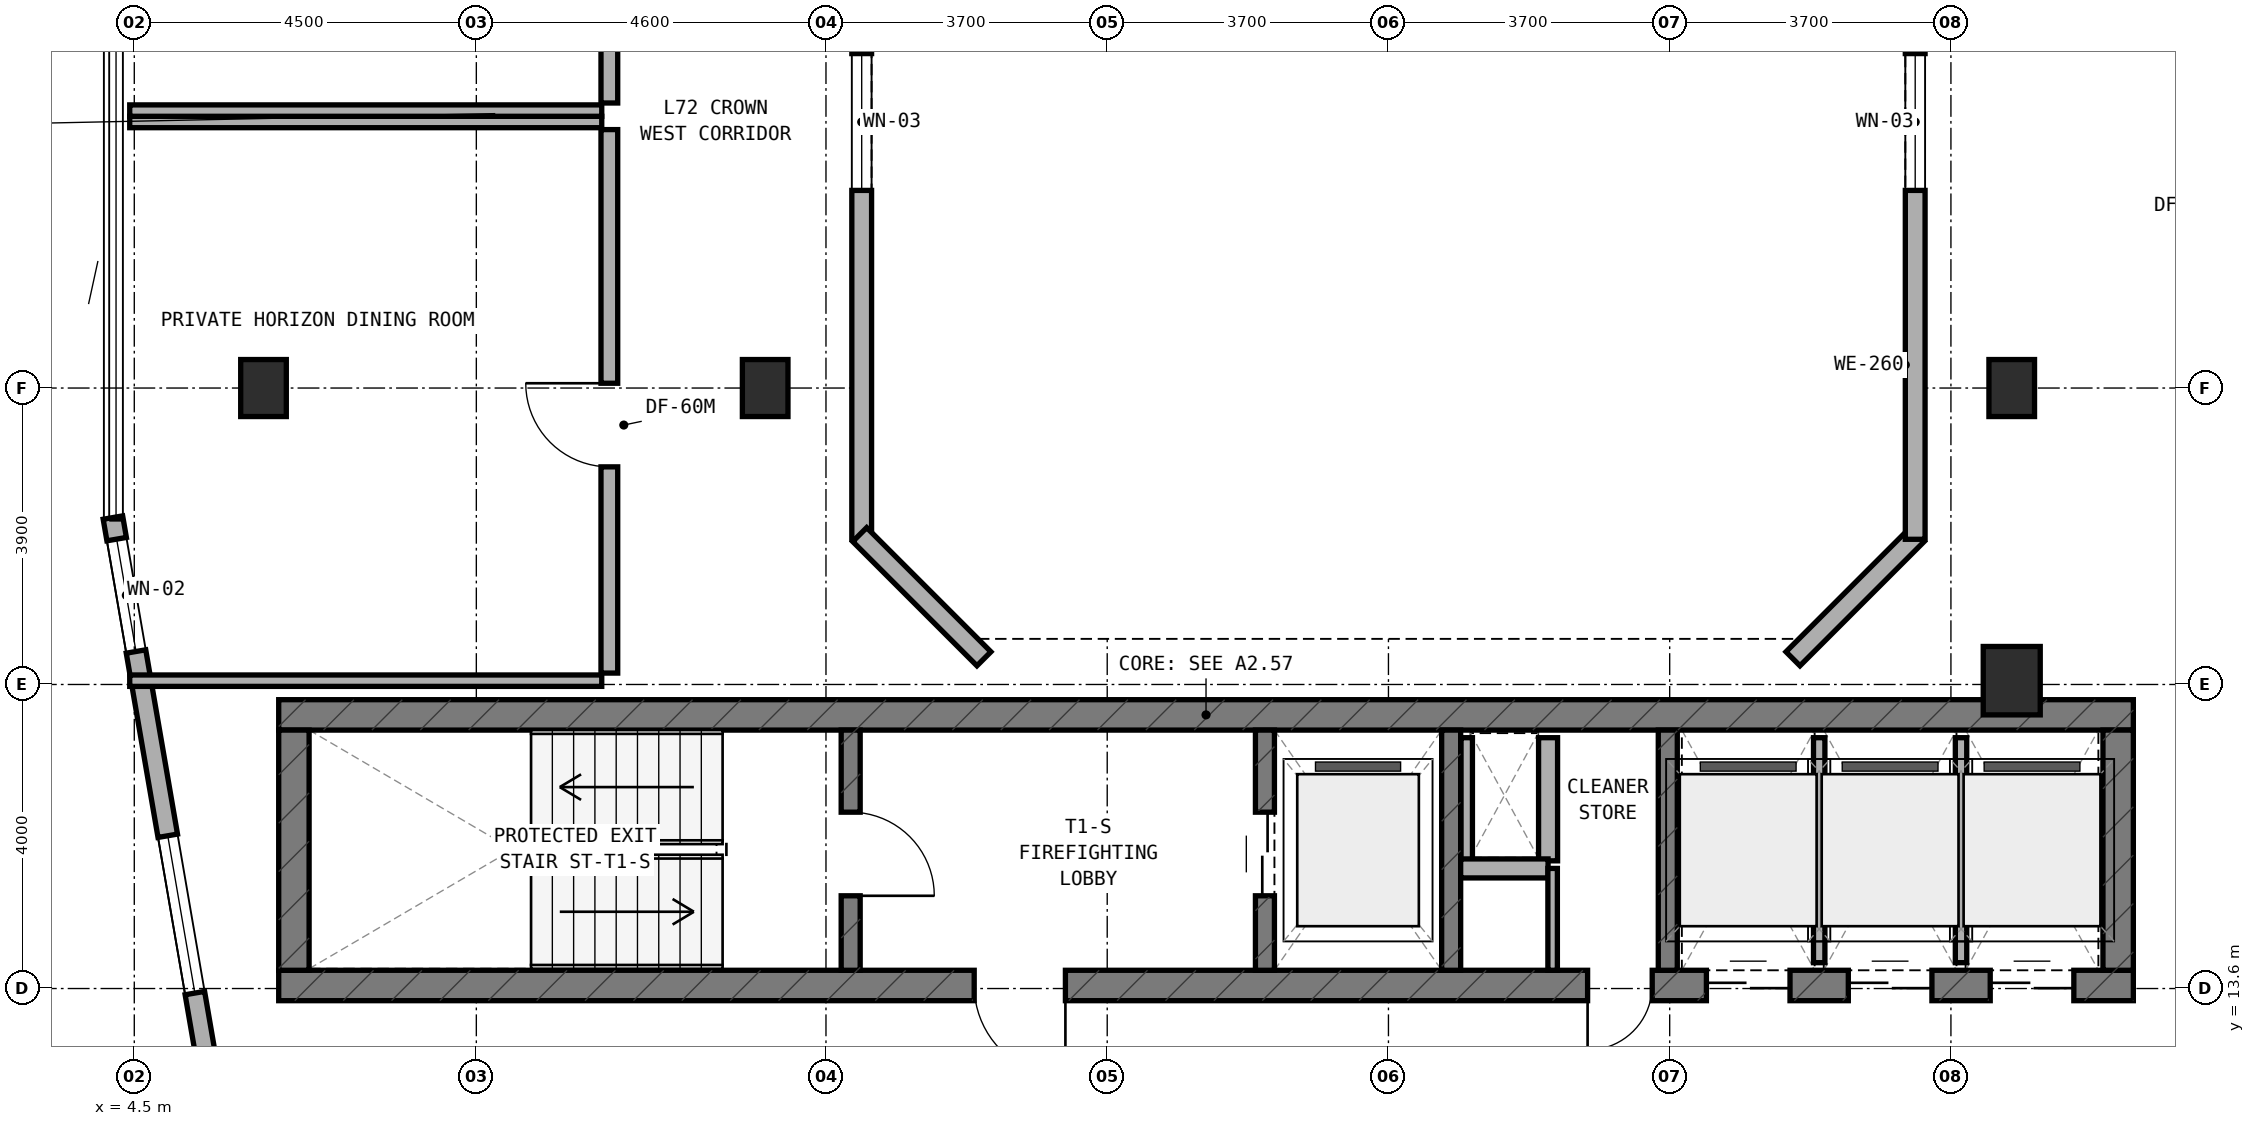
"""IFC4 building model, lengths in metres.
Left out: names, types, materials, properties, quantities, classifications, styles, units other than length and angle.
Written with IfcOpenShell. Run it as: python <this file> out.ifc"""

import sys

from ifc_helpers import new_model, si_unit, direction, frame, frame_2d, origin, origin_2d, place, context, subcontext, project, spatial, rectangle, extrude, element, fill, save


model = new_model("IFC4")
c1 = context("Model", 3, precision=1e-05, world=origin(), true_north=direction((0.0, 1.0)))
c2 = subcontext(c1, "Body", "Model", "MODEL_VIEW")
j1 = project(units=[si_unit("LENGTHUNIT", "METRE"), si_unit("PLANEANGLEUNIT", "RADIAN")], contexts=[c1])
p1 = place(None, origin())
s1 = spatial("IfcSite", under=j1, at=p1, CompositionType="ELEMENT")
p2 = place(p1, origin())
s2 = spatial("IfcBuilding", under=s1, at=p2, CompositionType="ELEMENT")
p3 = place(p2, frame((0.0, 0.0, 264.8)))
s3 = spatial("IfcBuildingStorey", under=s2, at=p3, CompositionType="ELEMENT", Elevation=264.8)
p4 = place(p3, frame((6.4, 13.64, 0.0), z_axis=(0.0, 0.0, 1.0), x_axis=(1.0, 0.0, 0.0)))
e1 = element("IfcWall", 1, at=p4, inside=s3, PredefinedType="SHEAR", context=c2, shape_type="SweptSolid", body=[
    extrude(rectangle(XDim=24.4, YDim=0.4, at=frame_2d((12.2, 0.0))), origin(), (0.0, 0.0, 1.0), 3.6),
])
p5 = place(p4, frame((9.15, 0.0, 0.0)))
e2 = element("IfcOpeningElement", 2, at=p5, cuts=e1, PredefinedType="OPENING", context=c2, shape_type="SweptSolid", body=[
    extrude(rectangle(XDim=1.2, YDim=2.15, at=frame_2d((0.6, 1.075))), frame((0.0, 0.21, 0.0), z_axis=(0.0, -1.0, 0.0), x_axis=(1.0, 0.0, 0.0)), (0.0, 0.0, 1.0), 0.42),
])
p6 = place(p4, frame((17.22, 0.0, 0.0)))
e3 = element("IfcOpeningElement", 3, at=p6, cuts=e1, PredefinedType="OPENING", context=c2, shape_type="SweptSolid", body=[
    extrude(rectangle(XDim=0.85, YDim=2.1, at=frame_2d((0.425, 1.05))), frame((0.0, 0.21, 0.0), z_axis=(0.0, -1.0, 0.0), x_axis=(1.0, 0.0, 0.0)), (0.0, 0.0, 1.0), 0.42),
])
p7 = place(p4, frame((18.783, 0.0, 0.0)))
e4 = element("IfcOpeningElement", 4, at=p7, cuts=e1, PredefinedType="OPENING", context=c2, shape_type="SweptSolid", body=[
    extrude(rectangle(XDim=1.1, YDim=2.15, at=frame_2d((0.55, 1.075))), frame((0.0, 0.21, 0.0), z_axis=(0.0, -1.0, 0.0), x_axis=(1.0, 0.0, 0.0)), (0.0, 0.0, 1.0), 0.42),
])
p8 = place(p4, frame((20.65, 0.0, 0.0)))
e5 = element("IfcOpeningElement", 5, at=p8, cuts=e1, PredefinedType="OPENING", context=c2, shape_type="SweptSolid", body=[
    extrude(rectangle(XDim=1.1, YDim=2.15, at=frame_2d((0.55, 1.075))), frame((0.0, 0.21, 0.0), z_axis=(0.0, -1.0, 0.0), x_axis=(1.0, 0.0, 0.0)), (0.0, 0.0, 1.0), 0.42),
])
p9 = place(p4, frame((22.517, 0.0, 0.0)))
e6 = element("IfcOpeningElement", 6, at=p9, cuts=e1, PredefinedType="OPENING", context=c2, shape_type="SweptSolid", body=[
    extrude(rectangle(XDim=1.1, YDim=2.15, at=frame_2d((0.55, 1.075))), frame((0.0, 0.21, 0.0), z_axis=(0.0, -1.0, 0.0), x_axis=(1.0, 0.0, 0.0)), (0.0, 0.0, 1.0), 0.42),
])
p10 = place(p3, frame((6.4, 17.2, 0.0), z_axis=(0.0, 0.0, 1.0), x_axis=(1.0, 0.0, 0.0)))
e7 = element("IfcWall", 7, at=p10, inside=s3, PredefinedType="SHEAR", context=c2, shape_type="SweptSolid", body=[
    extrude(rectangle(XDim=24.4, YDim=0.4, at=frame_2d((12.2, 0.0))), origin(), (0.0, 0.0, 1.0), 3.6),
])
for number, where, z_axis, x_axis in (
    (8, (6.6, 13.84, 0.0), (0.0, 0.0, 1.0), (0.0, 1.0, 0.0)),
    (9, (30.6, 13.84, 0.0), (0.0, 0.0, 1.0), (0.0, 1.0, 0.0)),
):
    element("IfcWall", number, at=place(p3, frame(where, z_axis=z_axis, x_axis=x_axis)), inside=s3, PredefinedType="SHEAR", context=c2, shape_type="SweptSolid", body=[
        extrude(rectangle(XDim=3.16, YDim=0.4, at=frame_2d((1.58, 0.0))), origin(), (0.0, 0.0, 1.0), 3.6),
    ])
p11 = place(p3, frame((13.925, 13.84, 0.0), z_axis=(0.0, 0.0, 1.0), x_axis=(0.0, 1.0, 0.0)))
e10 = element("IfcWall", 10, at=p11, inside=s3, PredefinedType="STANDARD", context=c2, shape_type="SweptSolid", body=[
    extrude(rectangle(XDim=3.16, YDim=0.25, at=frame_2d((1.58, 0.0))), origin(), (0.0, 0.0, 1.0), 3.32),
])
p12 = place(p11, frame((0.98, 0.0, 0.0)))
e11 = element("IfcOpeningElement", 11, at=p12, cuts=e10, PredefinedType="OPENING", context=c2, shape_type="SweptSolid", body=[
    extrude(rectangle(XDim=1.1, YDim=2.15, at=frame_2d((0.55, 1.075))), frame((0.0, 0.135, 0.0), z_axis=(0.0, -1.0, 0.0), x_axis=(1.0, 0.0, 0.0)), (0.0, 0.0, 1.0), 0.27),
])
p13 = place(p3, frame((19.375, 13.84, 0.0), z_axis=(0.0, 0.0, 1.0), x_axis=(0.0, 1.0, 0.0)))
e12 = element("IfcWall", 12, at=p13, inside=s3, PredefinedType="STANDARD", context=c2, shape_type="SweptSolid", body=[
    extrude(rectangle(XDim=3.16, YDim=0.25, at=frame_2d((1.58, 0.0))), origin(), (0.0, 0.0, 1.0), 3.32),
])
p14 = place(p13, frame((0.98, 0.0, 0.0)))
e13 = element("IfcOpeningElement", 13, at=p14, cuts=e12, PredefinedType="OPENING", context=c2, shape_type="SweptSolid", body=[
    extrude(rectangle(XDim=1.1, YDim=2.15, at=frame_2d((0.55, 1.075))), frame((0.0, 0.135, 0.0), z_axis=(0.0, -1.0, 0.0), x_axis=(1.0, 0.0, 0.0)), (0.0, 0.0, 1.0), 0.27),
])
for number, where, z_axis, x_axis in (
    (14, (21.825, 13.84, 0.0), (0.0, 0.0, 1.0), (0.0, 1.0, 0.0)),
    (15, (24.675, 13.84, 0.0), (0.0, 0.0, 1.0), (0.0, 1.0, 0.0)),
):
    element("IfcWall", number, at=place(p3, frame(where, z_axis=z_axis, x_axis=x_axis)), inside=s3, PredefinedType="STANDARD", context=c2, shape_type="SweptSolid", body=[
        extrude(rectangle(XDim=3.16, YDim=0.25, at=frame_2d((1.58, 0.0))), origin(), (0.0, 0.0, 1.0), 3.32),
    ])
for number, where, z_axis, x_axis in (
    (16, (6.2, 21.5, 0.0), (0.0, 0.0, 1.0), (1.0, 0.0, 0.0)),
    (17, (12.8, 21.5, 0.0), (0.0, 0.0, 1.0), (1.0, 0.0, 0.0)),
):
    element("IfcColumn", number, at=place(p3, frame(where, z_axis=z_axis, x_axis=x_axis)), inside=s3, PredefinedType="COLUMN", context=c2, shape_type="SweptSolid", body=[
        extrude(rectangle(XDim=0.6, YDim=0.75, at=origin_2d()), origin(), (0.0, 0.0, 1.0), 3.6),
    ])
p15 = place(p3, frame((29.2, 17.65, 0.0), z_axis=(0.0, 0.0, 1.0), x_axis=(1.0, 0.0, 0.0)))
e18 = element("IfcColumn", 18, at=p15, inside=s3, PredefinedType="COLUMN", context=c2, shape_type="SweptSolid", body=[
    extrude(rectangle(XDim=0.75, YDim=0.9, at=origin_2d()), origin(), (0.0, 0.0, 1.0), 3.6),
])
p16 = place(p3, frame((29.2, 21.5, 0.0), z_axis=(0.0, 0.0, 1.0), x_axis=(1.0, 0.0, 0.0)))
e19 = element("IfcColumn", 19, at=p16, inside=s3, PredefinedType="COLUMN", context=c2, shape_type="SweptSolid", body=[
    extrude(rectangle(XDim=0.6, YDim=0.75, at=origin_2d()), origin(), (0.0, 0.0, 1.0), 3.6),
])
p17 = place(p3, frame((4.219, 19.796, 0.0), z_axis=(0.0, 0.0, 1.0), x_axis=(0.169818291056, -0.985475391891, 0.0)))
e20 = element("IfcWall", 20, at=p17, inside=s3, PredefinedType="STANDARD", context=c2, shape_type="SweptSolid", body=[
    extrude(rectangle(XDim=8.302, YDim=0.26, at=frame_2d((4.151, 0.0))), origin(), (0.0, 0.0, 1.0), 3.32),
])
p18 = place(p17, frame((0.288, 0.0, 0.85)))
e21 = element("IfcOpeningElement", 21, at=p18, cuts=e20, PredefinedType="OPENING", context=c2, shape_type="SweptSolid", body=[
    extrude(rectangle(XDim=1.5, YDim=1.5, at=frame_2d((0.75, 0.75))), frame((0.0, 0.14, 0.0), z_axis=(0.0, -1.0, 0.0), x_axis=(1.0, 0.0, 0.0)), (0.0, 0.0, 1.0), 0.28),
])
p19 = place(p17, frame((4.248, 0.0, 0.85)))
e22 = element("IfcOpeningElement", 22, at=p19, cuts=e20, PredefinedType="OPENING", context=c2, shape_type="SweptSolid", body=[
    extrude(rectangle(XDim=2.1, YDim=1.5, at=frame_2d((1.05, 0.75))), frame((0.0, 0.14, 0.0), z_axis=(0.0, -1.0, 0.0), x_axis=(1.0, 0.0, 0.0)), (0.0, 0.0, 1.0), 0.28),
])
p20 = place(p3, frame((26.322, 17.938, 0.0), z_axis=(0.0, 0.0, 1.0), x_axis=(0.707106781187, 0.707106781187, 0.0)))
e23 = element("IfcWall", 23, at=p20, inside=s3, PredefinedType="STANDARD", context=c2, shape_type="SweptSolid", body=[
    extrude(rectangle(XDim=2.311, YDim=0.26, at=frame_2d((1.155, 0.0))), origin(), (0.0, 0.0, 1.0), 3.32),
])
p21 = place(p3, frame((27.93, 19.51, 0.0), z_axis=(0.0, 0.0, 1.0), x_axis=(0.0, 1.0, 0.0)))
e24 = element("IfcWall", 24, at=p21, inside=s3, PredefinedType="STANDARD", context=c2, shape_type="SweptSolid", body=[
    extrude(rectangle(XDim=10.98, YDim=0.26, at=frame_2d((5.49, 0.0))), origin(), (0.0, 0.0, 1.0), 3.32),
])
p22 = place(p21, frame((4.59, 0.0, 0.85)))
e25 = element("IfcOpeningElement", 25, at=p22, cuts=e24, PredefinedType="OPENING", context=c2, shape_type="SweptSolid", body=[
    extrude(rectangle(XDim=1.8, YDim=1.5, at=frame_2d((0.9, 0.75))), frame((0.0, 0.14, 0.0), z_axis=(0.0, -1.0, 0.0), x_axis=(1.0, 0.0, 0.0)), (0.0, 0.0, 1.0), 0.28),
])
p23 = place(p3, frame((14.07, 30.49, 0.0), z_axis=(0.0, 0.0, 1.0), x_axis=(0.0, -1.0, 0.0)))
e26 = element("IfcWall", 26, at=p23, inside=s3, PredefinedType="STANDARD", context=c2, shape_type="SweptSolid", body=[
    extrude(rectangle(XDim=10.98, YDim=0.26, at=frame_2d((5.49, 0.0))), origin(), (0.0, 0.0, 1.0), 3.32),
])
p24 = place(p23, frame((4.59, 0.0, 0.85)))
e27 = element("IfcOpeningElement", 27, at=p24, cuts=e26, PredefinedType="OPENING", context=c2, shape_type="SweptSolid", body=[
    extrude(rectangle(XDim=1.8, YDim=1.5, at=frame_2d((0.9, 0.75))), frame((0.0, 0.14, 0.0), z_axis=(0.0, -1.0, 0.0), x_axis=(1.0, 0.0, 0.0)), (0.0, 0.0, 1.0), 0.28),
])
p25 = place(p3, frame((14.044, 19.572, 0.0), z_axis=(0.0, 0.0, 1.0), x_axis=(0.707106781187, -0.707106781187, 0.0)))
e28 = element("IfcWall", 28, at=p25, inside=s3, PredefinedType="STANDARD", context=c2, shape_type="SweptSolid", body=[
    extrude(rectangle(XDim=2.311, YDim=0.26, at=frame_2d((1.155, 0.0))), origin(), (0.0, 0.0, 1.0), 3.32),
])
p26 = place(p3, frame((22.03, 15.28, 0.0), z_axis=(0.0, 0.0, 1.0), x_axis=(0.0, 1.0, 0.0)))
e29 = element("IfcWall", 29, at=p26, inside=s3, PredefinedType="PARTITIONING", context=c2, shape_type="SweptSolid", body=[
    extrude(rectangle(XDim=1.62, YDim=0.15, at=frame_2d((0.81, 0.0))), origin(), (0.0, 0.0, 1.0), 3.32),
])
p27 = place(p3, frame((23.1, 15.28, 0.0), z_axis=(0.0, 0.0, 1.0), x_axis=(0.0, 1.0, 0.0)))
e30 = element("IfcWall", 30, at=p27, inside=s3, PredefinedType="SOLIDWALL", context=c2, shape_type="SweptSolid", body=[
    extrude(rectangle(XDim=1.62, YDim=0.25, at=frame_2d((0.81, 0.0))), origin(), (0.0, 0.0, 1.0), 3.32),
])
p28 = place(p3, frame((21.95, 15.18, 0.0), z_axis=(0.0, 0.0, 1.0), x_axis=(1.0, 0.0, 0.0)))
e31 = element("IfcWall", 31, at=p28, inside=s3, PredefinedType="SOLIDWALL", context=c2, shape_type="SweptSolid", body=[
    extrude(rectangle(XDim=1.15, YDim=0.25, at=frame_2d((0.575, 0.0))), origin(), (0.0, 0.0, 1.0), 3.32),
])
p29 = place(p3, frame((23.16, 13.84, 0.0), z_axis=(0.0, 0.0, 1.0), x_axis=(0.0, 1.0, 0.0)))
e32 = element("IfcWall", 32, at=p29, inside=s3, PredefinedType="PARTITIONING", context=c2, shape_type="SweptSolid", body=[
    extrude(rectangle(XDim=1.34, YDim=0.125, at=frame_2d((0.67, 0.0))), origin(), (0.0, 0.0, 1.0), 3.32),
])
p30 = place(p3, frame((26.667, 13.94, 0.0), z_axis=(0.0, 0.0, 1.0), x_axis=(0.0, 1.0, 0.0)))
e33 = element("IfcWall", 33, at=p30, inside=s3, PredefinedType="PARTITIONING", context=c2, shape_type="SweptSolid", body=[
    extrude(rectangle(XDim=2.96, YDim=0.15, at=frame_2d((1.48, 0.0))), origin(), (0.0, 0.0, 1.0), 3.32),
])
p31 = place(p3, frame((28.533, 13.94, 0.0), z_axis=(0.0, 0.0, 1.0), x_axis=(0.0, 1.0, 0.0)))
e34 = element("IfcWall", 34, at=p31, inside=s3, PredefinedType="PARTITIONING", context=c2, shape_type="SweptSolid", body=[
    extrude(rectangle(XDim=2.96, YDim=0.15, at=frame_2d((1.48, 0.0))), origin(), (0.0, 0.0, 1.0), 2.795),
])
p32 = place(p3, frame((4.44, 17.65, 0.0), z_axis=(0.0, 0.0, 1.0), x_axis=(1.0, 0.0, 0.0)))
e35 = element("IfcWall", 35, at=p32, inside=s3, PredefinedType="PARTITIONING", context=c2, shape_type="SweptSolid", body=[
    extrude(rectangle(XDim=6.21, YDim=0.15, at=frame_2d((3.105, 0.0))), origin(), (0.0, 0.0, 1.0), 3.32),
])
p33 = place(p3, frame((4.44, 25.0, 0.0), z_axis=(0.0, 0.0, 1.0), x_axis=(1.0, 0.0, 0.0)))
e36 = element("IfcWall", 36, at=p33, inside=s3, PredefinedType="PARTITIONING", context=c2, shape_type="SweptSolid", body=[
    extrude(rectangle(XDim=6.21, YDim=0.15, at=frame_2d((3.105, 0.0))), origin(), (0.0, 0.0, 1.0), 3.015),
])
p34 = place(p3, frame((10.75, 17.75, 0.0), z_axis=(0.0, 0.0, 1.0), x_axis=(0.0, 1.0, 0.0)))
e37 = element("IfcWall", 37, at=p34, inside=s3, PredefinedType="SOLIDWALL", context=c2, shape_type="SweptSolid", body=[
    extrude(rectangle(XDim=7.15, YDim=0.22, at=frame_2d((3.575, 0.0))), origin(), (0.0, 0.0, 1.0), 2.795),
])
p35 = place(p34, frame((2.713, 0.0, 0.0)))
e38 = element("IfcOpeningElement", 38, at=p35, cuts=e37, PredefinedType="OPENING", context=c2, shape_type="SweptSolid", body=[
    extrude(rectangle(XDim=1.1, YDim=2.1, at=frame_2d((0.55, 1.05))), frame((0.0, 0.12, 0.0), z_axis=(0.0, -1.0, 0.0), x_axis=(1.0, 0.0, 0.0)), (0.0, 0.0, 1.0), 0.24),
])
p36 = place(p3, frame((4.44, 25.15, 0.0), z_axis=(0.0, 0.0, 1.0), x_axis=(1.0, 0.0, 0.0)))
e39 = element("IfcWall", 39, at=p36, inside=s3, PredefinedType="PARTITIONING", context=c2, shape_type="SweptSolid", body=[
    extrude(rectangle(XDim=6.21, YDim=0.15, at=frame_2d((3.105, 0.0))), origin(), (0.0, 0.0, 1.0), 3.015),
])
p37 = place(p3, frame((10.75, 25.25, 0.0), z_axis=(0.0, 0.0, 1.0), x_axis=(0.0, 1.0, 0.0)))
e40 = element("IfcWall", 40, at=p37, inside=s3, PredefinedType="SOLIDWALL", context=c2, shape_type="SweptSolid", body=[
    extrude(rectangle(XDim=7.0, YDim=0.22, at=frame_2d((3.5, 0.0))), origin(), (0.0, 0.0, 1.0), 2.795),
])
p38 = place(p37, frame((2.645, 0.0, 0.0)))
e41 = element("IfcOpeningElement", 41, at=p38, cuts=e40, PredefinedType="OPENING", context=c2, shape_type="SweptSolid", body=[
    extrude(rectangle(XDim=1.1, YDim=2.1, at=frame_2d((0.55, 1.05))), frame((0.0, 0.12, 0.0), z_axis=(0.0, -1.0, 0.0), x_axis=(1.0, 0.0, 0.0)), (0.0, 0.0, 1.0), 0.24),
])
p39 = place(p18, origin())
e42 = element("IfcWindow", 42, at=p39, inside=s3, PartitioningType="SINGLE_PANEL", PredefinedType="WINDOW", context=c2, shape_type="SweptSolid", body=[
    extrude(rectangle(XDim=1.5, YDim=1.5, at=frame_2d((0.75, 0.75))), frame((0.0, 0.03, 0.0), z_axis=(0.0, -1.0, 0.0), x_axis=(1.0, 0.0, 0.0)), (0.0, 0.0, 1.0), 0.06),
])
fill(e21, e42)
p40 = place(p19, origin())
e43 = element("IfcWindow", 43, at=p40, inside=s3, PartitioningType="SINGLE_PANEL", PredefinedType="WINDOW", context=c2, shape_type="SweptSolid", body=[
    extrude(rectangle(XDim=2.1, YDim=1.5, at=frame_2d((1.05, 0.75))), frame((0.0, 0.03, 0.0), z_axis=(0.0, -1.0, 0.0), x_axis=(1.0, 0.0, 0.0)), (0.0, 0.0, 1.0), 0.06),
])
fill(e22, e43)
p41 = place(p22, origin())
e44 = element("IfcWindow", 44, at=p41, inside=s3, PartitioningType="SINGLE_PANEL", PredefinedType="WINDOW", context=c2, shape_type="SweptSolid", body=[
    extrude(rectangle(XDim=1.8, YDim=1.5, at=frame_2d((0.9, 0.75))), frame((0.0, 0.03, 0.0), z_axis=(0.0, -1.0, 0.0), x_axis=(1.0, 0.0, 0.0)), (0.0, 0.0, 1.0), 0.06),
])
fill(e25, e44)
p42 = place(p24, origin())
e45 = element("IfcWindow", 45, at=p42, inside=s3, PartitioningType="SINGLE_PANEL", PredefinedType="WINDOW", context=c2, shape_type="SweptSolid", body=[
    extrude(rectangle(XDim=1.8, YDim=1.5, at=frame_2d((0.9, 0.75))), frame((0.0, 0.03, 0.0), z_axis=(0.0, -1.0, 0.0), x_axis=(1.0, 0.0, 0.0)), (0.0, 0.0, 1.0), 0.06),
])
fill(e27, e45)
p43 = place(p12, frame((1.1, 0.0, 0.0), z_axis=(0.0, 0.0, 1.0), x_axis=(-1.0, 0.0, 0.0)))
e46 = element("IfcDoor", 46, at=p43, inside=s3, OperationType="SINGLE_SWING_RIGHT", PredefinedType="DOOR", context=c2, shape_type="SweptSolid", body=[
    extrude(rectangle(XDim=1.1, YDim=2.15, at=frame_2d((0.55, 1.075))), frame((0.0, 0.025, 0.0), z_axis=(0.0, -1.0, 0.0), x_axis=(1.0, 0.0, 0.0)), (0.0, 0.0, 1.0), 0.05),
])
fill(e11, e46)
p44 = place(p5, frame((1.2, 0.0, 0.0), z_axis=(0.0, 0.0, 1.0), x_axis=(-1.0, 0.0, 0.0)))
e47 = element("IfcDoor", 47, at=p44, inside=s3, OperationType="SINGLE_SWING_LEFT", PredefinedType="DOOR", context=c2, shape_type="SweptSolid", body=[
    extrude(rectangle(XDim=1.2, YDim=2.15, at=frame_2d((0.6, 1.075))), frame((0.0, 0.025, 0.0), z_axis=(0.0, -1.0, 0.0), x_axis=(1.0, 0.0, 0.0)), (0.0, 0.0, 1.0), 0.05),
])
fill(e2, e47)
p45 = place(p14, origin())
e48 = element("IfcDoor", 48, at=p45, inside=s3, OperationType="DOUBLE_DOOR_SLIDING", PredefinedType="DOOR", context=c2, shape_type="SweptSolid", body=[
    extrude(rectangle(XDim=1.1, YDim=2.15, at=frame_2d((0.55, 1.075))), frame((0.0, 0.025, 0.0), z_axis=(0.0, -1.0, 0.0), x_axis=(1.0, 0.0, 0.0)), (0.0, 0.0, 1.0), 0.05),
])
fill(e13, e48)
p46 = place(p6, frame((0.85, 0.0, 0.0), z_axis=(0.0, 0.0, 1.0), x_axis=(-1.0, 0.0, 0.0)))
e49 = element("IfcDoor", 49, at=p46, inside=s3, OperationType="SINGLE_SWING_RIGHT", PredefinedType="DOOR", context=c2, shape_type="SweptSolid", body=[
    extrude(rectangle(XDim=0.85, YDim=2.1, at=frame_2d((0.425, 1.05))), frame((0.0, 0.025, 0.0), z_axis=(0.0, -1.0, 0.0), x_axis=(1.0, 0.0, 0.0)), (0.0, 0.0, 1.0), 0.05),
])
fill(e3, e49)
p47 = place(p7, frame((1.1, 0.0, 0.0), z_axis=(0.0, 0.0, 1.0), x_axis=(-1.0, 0.0, 0.0)))
e50 = element("IfcDoor", 50, at=p47, inside=s3, OperationType="DOUBLE_DOOR_SLIDING", PredefinedType="DOOR", context=c2, shape_type="SweptSolid", body=[
    extrude(rectangle(XDim=1.1, YDim=2.15, at=frame_2d((0.55, 1.075))), frame((0.0, 0.025, 0.0), z_axis=(0.0, -1.0, 0.0), x_axis=(1.0, 0.0, 0.0)), (0.0, 0.0, 1.0), 0.05),
])
fill(e4, e50)
p48 = place(p8, frame((1.1, 0.0, 0.0), z_axis=(0.0, 0.0, 1.0), x_axis=(-1.0, 0.0, 0.0)))
e51 = element("IfcDoor", 51, at=p48, inside=s3, OperationType="DOUBLE_DOOR_SLIDING", PredefinedType="DOOR", context=c2, shape_type="SweptSolid", body=[
    extrude(rectangle(XDim=1.1, YDim=2.15, at=frame_2d((0.55, 1.075))), frame((0.0, 0.025, 0.0), z_axis=(0.0, -1.0, 0.0), x_axis=(1.0, 0.0, 0.0)), (0.0, 0.0, 1.0), 0.05),
])
fill(e5, e51)
p49 = place(p9, frame((1.1, 0.0, 0.0), z_axis=(0.0, 0.0, 1.0), x_axis=(-1.0, 0.0, 0.0)))
e52 = element("IfcDoor", 52, at=p49, inside=s3, OperationType="DOUBLE_DOOR_SLIDING", PredefinedType="DOOR", context=c2, shape_type="SweptSolid", body=[
    extrude(rectangle(XDim=1.1, YDim=2.15, at=frame_2d((0.55, 1.075))), frame((0.0, 0.025, 0.0), z_axis=(0.0, -1.0, 0.0), x_axis=(1.0, 0.0, 0.0)), (0.0, 0.0, 1.0), 0.05),
])
fill(e6, e52)
p50 = place(p35, origin())
e53 = element("IfcDoor", 53, at=p50, inside=s3, OperationType="SINGLE_SWING_RIGHT", PredefinedType="DOOR", context=c2, shape_type="SweptSolid", body=[
    extrude(rectangle(XDim=1.1, YDim=2.1, at=frame_2d((0.55, 1.05))), frame((0.0, 0.025, 0.0), z_axis=(0.0, -1.0, 0.0), x_axis=(1.0, 0.0, 0.0)), (0.0, 0.0, 1.0), 0.05),
])
fill(e38, e53)
save(model, sys.argv[1])
